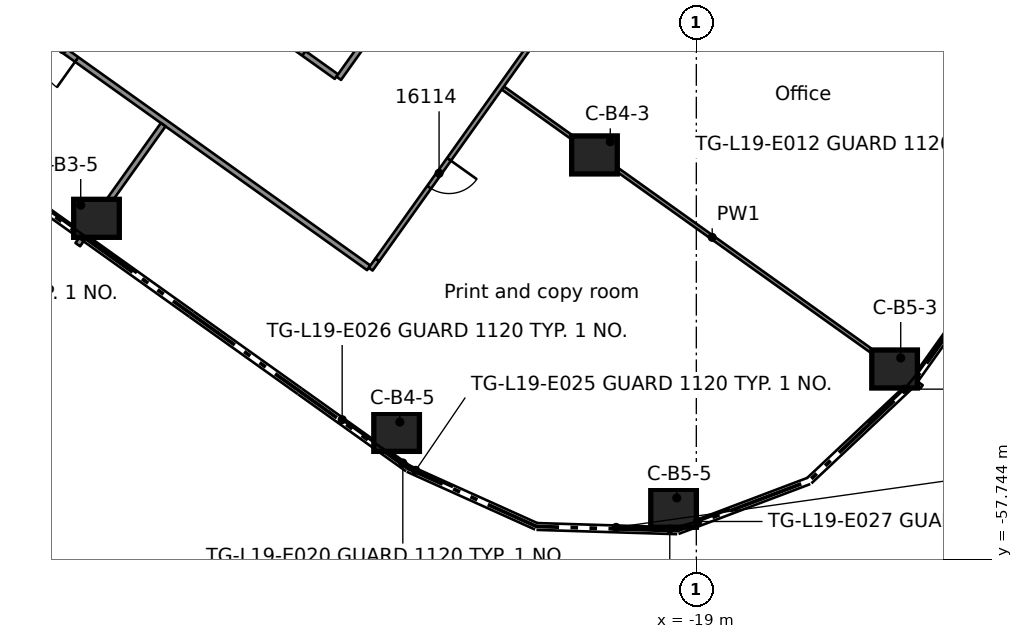
"""IFC4 building model, lengths in metres.
Left out: names, types, materials, properties, quantities, classifications, styles, units other than length and angle.
Written with IfcOpenShell. Run it as: python <this file> out.ifc"""

import sys

from ifc_helpers import new_model, si_unit, direction, frame, frame_2d, origin, origin_2d, place, context, subcontext, project, spatial, rectangle, extrude, element, fill, save


model = new_model("IFC4")
c1 = context("Model", 3, precision=1e-05, world=origin(), true_north=direction((0.0, 1.0)))
c2 = subcontext(c1, "Body", "Model", "MODEL_VIEW")
j1 = project(units=[si_unit("LENGTHUNIT", "METRE"), si_unit("PLANEANGLEUNIT", "RADIAN")], contexts=[c1])
p1 = place(None, origin())
s1 = spatial("IfcSite", under=j1, at=p1, CompositionType="ELEMENT")
p2 = place(p1, origin())
s2 = spatial("IfcBuilding", under=s1, at=p2, CompositionType="ELEMENT")
p3 = place(p2, frame((0.0, 0.0, 80.7)))
s3 = spatial("IfcBuildingStorey", under=s2, at=p3, CompositionType="ELEMENT", Elevation=80.7)
for number, where, z_axis, x_axis in (
    (1, (-34.784, -48.766, 0.0), (0.0, 0.0, 1.0), (1.0, 0.0, 0.0)),
    (2, (-21.68, -47.098, 0.0), (0.0, 0.0, 1.0), (1.0, 0.0, 0.0)),
    (3, (-26.887, -54.398, 0.0), (0.0, 0.0, 1.0), (1.0, 0.0, 0.0)),
    (4, (-13.783, -52.731, 0.0), (0.0, 0.0, 1.0), (1.0, 0.0, 0.0)),
    (5, (-19.599, -56.395, 0.0), (0.0, 0.0, 1.0), (1.0, 0.0, 0.0)),
):
    element("IfcColumn", number, at=place(p3, frame(where, z_axis=z_axis, x_axis=x_axis)), inside=s3, PredefinedType="COLUMN", context=c2, shape_type="SweptSolid", body=[
        extrude(rectangle(XDim=1.2, YDim=1.0, at=origin_2d()), origin(), (0.0, 0.0, 1.0), 3.5),
    ])
p4 = place(p3, frame((-27.621, -50.068, 0.0), z_axis=(0.0, 0.0, 1.0), x_axis=(-0.814096747286, 0.580729270881, 0.0)))
e6 = element("IfcWall", 6, at=p4, inside=s3, PredefinedType="PARTITIONING", context=c2, shape_type="SweptSolid", body=[
    extrude(rectangle(XDim=13.163, YDim=0.15, at=frame_2d((6.582, 0.0))), origin(), (0.0, 0.0, 1.0), 3.08),
])
p5 = place(p4, frame((9.438, 0.0, 0.0)))
e7 = element("IfcOpeningElement", 7, at=p5, cuts=e6, PredefinedType="OPENING", context=c2, shape_type="SweptSolid", body=[
    extrude(rectangle(XDim=0.9, YDim=2.1, at=frame_2d((0.45, 1.05))), frame((0.0, 0.085, 0.0), z_axis=(0.0, -1.0, 0.0), x_axis=(1.0, 0.0, 0.0)), (0.0, 0.0, 1.0), 0.17),
])
p6 = place(p3, frame((-30.765, -43.402, 0.0), z_axis=(0.0, 0.0, 1.0), x_axis=(0.814324494631, -0.580409870216, 0.0)))
e8 = element("IfcWall", 8, at=p6, inside=s3, PredefinedType="PARTITIONING", context=c2, shape_type="SweptSolid", body=[
    extrude(rectangle(XDim=2.817, YDim=0.15, at=frame_2d((1.408, 0.0))), origin(), (0.0, 0.0, 1.0), 3.08),
])
p7 = place(p6, frame((0.865, 0.0, 0.0)))
e9 = element("IfcOpeningElement", 9, at=p7, cuts=e8, PredefinedType="OPENING", context=c2, shape_type="SweptSolid", body=[
    extrude(rectangle(XDim=0.9, YDim=2.1, at=frame_2d((0.45, 1.05))), frame((0.0, 0.085, 0.0), z_axis=(0.0, -1.0, 0.0), x_axis=(1.0, 0.0, 0.0)), (0.0, 0.0, 1.0), 0.17),
])
p8 = place(p3, frame((-24.092, -45.337, 0.0), z_axis=(0.0, 0.0, 1.0), x_axis=(0.81412935301, -0.580683559753, 0.0)))
e10 = element("IfcWall", 10, at=p8, inside=s3, PredefinedType="PARTITIONING", context=c2, shape_type="SweptSolid", body=[
    extrude(rectangle(XDim=13.536, YDim=0.1, at=frame_2d((6.768, 0.0))), origin(), (0.0, 0.0, 1.0), 3.08),
])
p9 = place(p3, frame((-18.924, -38.091, 0.0), z_axis=(0.0, 0.0, 1.0), x_axis=(0.814103772743, -0.580719422101, 0.0)))
e11 = element("IfcWall", 11, at=p9, inside=s3, PredefinedType="PARTITIONING", context=c2, shape_type="SweptSolid", body=[
    extrude(rectangle(XDim=13.536, YDim=0.1, at=frame_2d((6.768, 0.0))), origin(), (0.0, 0.0, 1.0), 3.08),
])
p10 = place(p3, frame((-27.57, -50.104, 0.0), z_axis=(0.0, 0.0, 1.0), x_axis=(0.583082940186, 0.812412632142, 0.0)))
e12 = element("IfcWall", 12, at=p10, inside=s3, PredefinedType="PARTITIONING", context=c2, shape_type="SweptSolid", body=[
    extrude(rectangle(XDim=0.3, YDim=0.125, at=frame_2d((0.15, 0.0))), origin(), (0.0, 0.0, 1.0), 3.08),
])
p11 = place(p3, frame((-12.787, -29.381, 0.0), z_axis=(0.0, 0.0, 1.0), x_axis=(-0.580712931826, -0.81410840237, 0.0)))
e13 = element("IfcWall", 13, at=p11, inside=s3, PredefinedType="PARTITIONING", context=c2, shape_type="SweptSolid", body=[
    extrude(rectangle(XDim=25.155, YDim=0.125, at=frame_2d((12.578, 0.0))), origin(), (0.0, 0.0, 1.0), 3.08),
])
p12 = place(p11, frame((4.948, 0.0, 0.0)))
e14 = element("IfcOpeningElement", 14, at=p12, cuts=e13, PredefinedType="OPENING", context=c2, shape_type="SweptSolid", body=[
    extrude(rectangle(XDim=0.9, YDim=2.1, at=frame_2d((0.45, 1.05))), frame((0.0, 0.073, 0.0), z_axis=(0.0, -1.0, 0.0), x_axis=(1.0, 0.0, 0.0)), (0.0, 0.0, 1.0), 0.145),
])
p13 = place(p11, frame((14.755, 0.0, 0.0)))
e15 = element("IfcOpeningElement", 15, at=p13, cuts=e13, PredefinedType="OPENING", context=c2, shape_type="SweptSolid", body=[
    extrude(rectangle(XDim=0.9, YDim=2.1, at=frame_2d((0.45, 1.05))), frame((0.0, 0.073, 0.0), z_axis=(0.0, -1.0, 0.0), x_axis=(1.0, 0.0, 0.0)), (0.0, 0.0, 1.0), 0.145),
])
p14 = place(p11, frame((21.906, 0.0, 0.0)))
e16 = element("IfcOpeningElement", 16, at=p14, cuts=e13, PredefinedType="OPENING", context=c2, shape_type="SweptSolid", body=[
    extrude(rectangle(XDim=0.9, YDim=2.1, at=frame_2d((0.45, 1.05))), frame((0.0, 0.073, 0.0), z_axis=(0.0, -1.0, 0.0), x_axis=(1.0, 0.0, 0.0)), (0.0, 0.0, 1.0), 0.145),
])
p15 = place(p3, frame((-28.41, -45.081, 0.0), z_axis=(0.0, 0.0, 1.0), x_axis=(0.580610007884, 0.814181809392, 0.0)))
e17 = element("IfcWall", 17, at=p15, inside=s3, PredefinedType="PARTITIONING", context=c2, shape_type="SweptSolid", body=[
    extrude(rectangle(XDim=21.035, YDim=0.15, at=frame_2d((10.517, 0.0))), origin(), (0.0, 0.0, 1.0), 3.08),
])
p16 = place(p3, frame((-35.277, -49.458, 0.0), z_axis=(0.0, 0.0, 1.0), x_axis=(0.580457100941, 0.814290828861, 0.0)))
e18 = element("IfcWall", 18, at=p16, inside=s3, PredefinedType="PARTITIONING", context=c2, shape_type="SweptSolid", body=[
    extrude(rectangle(XDim=3.875, YDim=0.15, at=frame_2d((1.937, 0.0))), origin(), (0.0, 0.0, 1.0), 3.08),
])
p17 = place(p7, origin())
e19 = element("IfcDoor", 19, at=p17, inside=s3, OperationType="SINGLE_SWING_LEFT", PredefinedType="DOOR", context=c2, shape_type="SweptSolid", body=[
    extrude(rectangle(XDim=0.9, YDim=2.1, at=frame_2d((0.45, 1.05))), frame((0.0, 0.025, 0.0), z_axis=(0.0, -1.0, 0.0), x_axis=(1.0, 0.0, 0.0)), (0.0, 0.0, 1.0), 0.05),
])
fill(e9, e19)
p18 = place(p14, origin())
e20 = element("IfcDoor", 20, at=p18, inside=s3, OperationType="SINGLE_SWING_RIGHT", PredefinedType="DOOR", context=c2, shape_type="SweptSolid", body=[
    extrude(rectangle(XDim=0.9, YDim=2.1, at=frame_2d((0.45, 1.05))), frame((0.0, 0.025, 0.0), z_axis=(0.0, -1.0, 0.0), x_axis=(1.0, 0.0, 0.0)), (0.0, 0.0, 1.0), 0.05),
])
fill(e16, e20)
p19 = place(p5, origin())
e21 = element("IfcDoor", 21, at=p19, inside=s3, OperationType="SINGLE_SWING_RIGHT", PredefinedType="DOOR", context=c2, shape_type="SweptSolid", body=[
    extrude(rectangle(XDim=0.9, YDim=2.1, at=frame_2d((0.45, 1.05))), frame((0.0, 0.025, 0.0), z_axis=(0.0, -1.0, 0.0), x_axis=(1.0, 0.0, 0.0)), (0.0, 0.0, 1.0), 0.05),
])
fill(e7, e21)
save(model, sys.argv[1])
